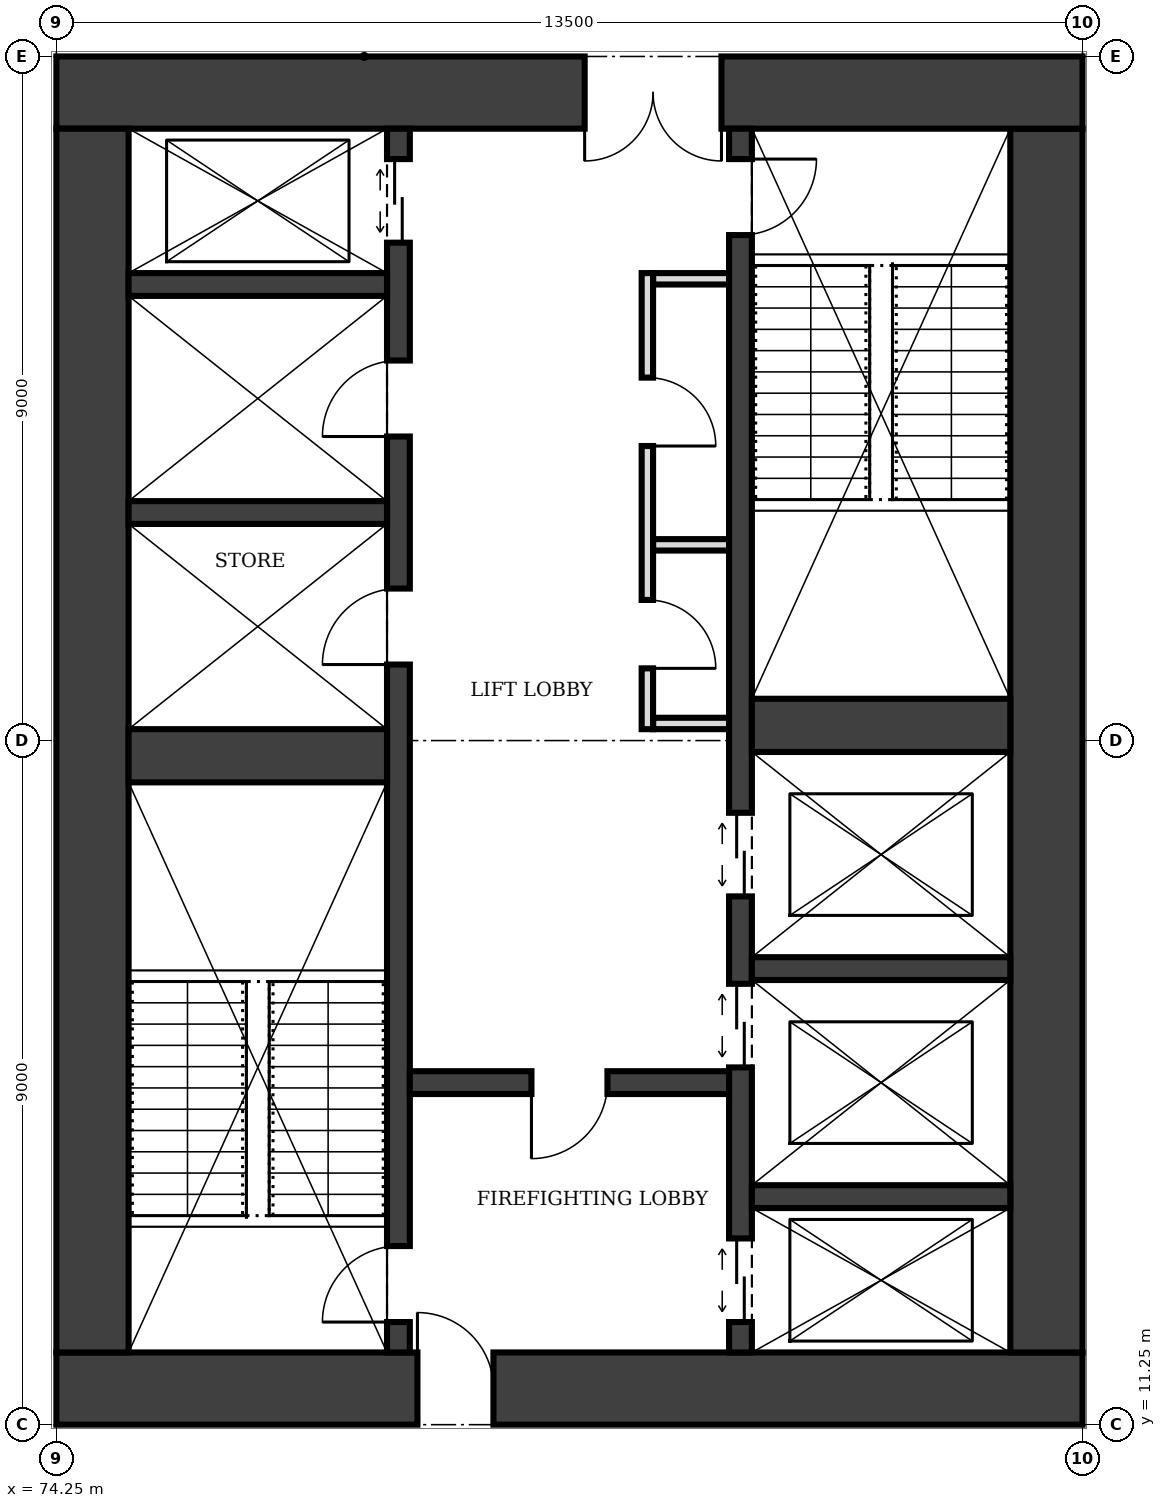
"""IFC4 building model, lengths in metres.
Left out: names, types, materials, properties, quantities, classifications, styles, units other than length and angle.
Written with IfcOpenShell. Run it as: python <this file> out.ifc"""

import sys

from ifc_helpers import new_model, si_unit, direction, frame, frame_2d, origin, place, context, subcontext, project, spatial, rectangle, extrude, element, fill, save


model = new_model("IFC4")
c1 = context("Model", 3, precision=1e-05, world=origin(), true_north=direction((0.0, 1.0)))
c2 = subcontext(c1, "Body", "Model", "MODEL_VIEW")
j1 = project(units=[si_unit("LENGTHUNIT", "METRE"), si_unit("PLANEANGLEUNIT", "RADIAN")], contexts=[c1])
p1 = place(None, origin())
s1 = spatial("IfcSite", under=j1, at=p1, CompositionType="ELEMENT")
p2 = place(p1, origin())
s2 = spatial("IfcBuilding", under=s1, at=p2, CompositionType="ELEMENT")
p3 = place(p2, frame((0.0, 0.0, 181.0)))
s3 = spatial("IfcBuildingStorey", under=s2, at=p3, CompositionType="ELEMENT", Elevation=181.0)
p4 = place(p3, frame((74.25, 11.725, 0.0), z_axis=(0.0, 0.0, 1.0), x_axis=(1.0, 0.0, 0.0)))
e1 = element("IfcWall", 1, at=p4, inside=s3, PredefinedType="SHEAR", context=c2, shape_type="SweptSolid", body=[
    extrude(rectangle(XDim=13.5, YDim=0.95, at=frame_2d((6.75, 0.0))), origin(), (0.0, 0.0, 1.0), 4.0),
])
p5 = place(p4, frame((4.75, 0.0, 0.0)))
e2 = element("IfcOpeningElement", 2, at=p5, cuts=e1, PredefinedType="OPENING", context=c2, shape_type="SweptSolid", body=[
    extrude(rectangle(XDim=1.0, YDim=2.1, at=frame_2d((0.5, 1.05))), frame((0.0, 0.485, 0.0), z_axis=(0.0, -1.0, 0.0), x_axis=(1.0, 0.0, 0.0)), (0.0, 0.0, 1.0), 0.97),
])
p6 = place(p3, frame((87.275, 12.2, 0.0), z_axis=(0.0, 0.0, 1.0), x_axis=(0.0, 1.0, 0.0)))
e3 = element("IfcWall", 3, at=p6, inside=s3, PredefinedType="SHEAR", context=c2, shape_type="SweptSolid", body=[
    extrude(rectangle(XDim=16.1, YDim=0.95, at=frame_2d((8.05, 0.0))), origin(), (0.0, 0.0, 1.0), 4.0),
])
p7 = place(p3, frame((87.75, 28.775, 0.0), z_axis=(0.0, 0.0, 1.0), x_axis=(-1.0, 0.0, 0.0)))
e4 = element("IfcWall", 4, at=p7, inside=s3, PredefinedType="SHEAR", context=c2, shape_type="SweptSolid", body=[
    extrude(rectangle(XDim=13.5, YDim=0.95, at=frame_2d((6.75, 0.0))), origin(), (0.0, 0.0, 1.0), 4.0),
])
p8 = place(p7, frame((4.75, 0.0, 0.0)))
e5 = element("IfcOpeningElement", 5, at=p8, cuts=e4, PredefinedType="OPENING", context=c2, shape_type="SweptSolid", body=[
    extrude(rectangle(XDim=1.8, YDim=2.1, at=frame_2d((0.9, 1.05))), frame((0.0, 0.485, 0.0), z_axis=(0.0, -1.0, 0.0), x_axis=(1.0, 0.0, 0.0)), (0.0, 0.0, 1.0), 0.97),
])
p9 = place(p3, frame((74.725, 28.3, 0.0), z_axis=(0.0, 0.0, 1.0), x_axis=(0.0, -1.0, 0.0)))
e6 = element("IfcWall", 6, at=p9, inside=s3, PredefinedType="SHEAR", context=c2, shape_type="SweptSolid", body=[
    extrude(rectangle(XDim=16.1, YDim=0.95, at=frame_2d((8.05, 0.0))), origin(), (0.0, 0.0, 1.0), 4.0),
])
p10 = place(p3, frame((78.75, 12.2, 0.0), z_axis=(0.0, 0.0, 1.0), x_axis=(0.0, 1.0, 0.0)))
e7 = element("IfcWall", 7, at=p10, inside=s3, PredefinedType="SHEAR", context=c2, shape_type="SweptSolid", body=[
    extrude(rectangle(XDim=16.1, YDim=0.3, at=frame_2d((8.05, 0.0))), origin(), (0.0, 0.0, 1.0), 4.0),
])
p11 = place(p10, frame((0.4, 0.0, 0.0)))
e8 = element("IfcOpeningElement", 8, at=p11, cuts=e7, PredefinedType="OPENING", context=c2, shape_type="SweptSolid", body=[
    extrude(rectangle(XDim=1.0, YDim=2.1, at=frame_2d((0.5, 1.05))), frame((0.0, 0.16, 0.0), z_axis=(0.0, -1.0, 0.0), x_axis=(1.0, 0.0, 0.0)), (0.0, 0.0, 1.0), 0.32),
])
p12 = place(p10, frame((14.6, 0.0, 0.0)))
e9 = element("IfcOpeningElement", 9, at=p12, cuts=e7, PredefinedType="OPENING", context=c2, shape_type="SweptSolid", body=[
    extrude(rectangle(XDim=1.1, YDim=2.1, at=frame_2d((0.55, 1.05))), frame((0.0, 0.16, 0.0), z_axis=(0.0, -1.0, 0.0), x_axis=(1.0, 0.0, 0.0)), (0.0, 0.0, 1.0), 0.32),
])
p13 = place(p10, frame((9.05, 0.0, 0.0)))
e10 = element("IfcOpeningElement", 10, at=p13, cuts=e7, PredefinedType="OPENING", context=c2, shape_type="SweptSolid", body=[
    extrude(rectangle(XDim=1.0, YDim=2.1, at=frame_2d((0.5, 1.05))), frame((0.0, 0.16, 0.0), z_axis=(0.0, -1.0, 0.0), x_axis=(1.0, 0.0, 0.0)), (0.0, 0.0, 1.0), 0.32),
])
p14 = place(p10, frame((12.05, 0.0, 0.0)))
e11 = element("IfcOpeningElement", 11, at=p14, cuts=e7, PredefinedType="OPENING", context=c2, shape_type="SweptSolid", body=[
    extrude(rectangle(XDim=1.0, YDim=2.1, at=frame_2d((0.5, 1.05))), frame((0.0, 0.16, 0.0), z_axis=(0.0, -1.0, 0.0), x_axis=(1.0, 0.0, 0.0)), (0.0, 0.0, 1.0), 0.32),
])
p15 = place(p3, frame((83.25, 12.2, 0.0), z_axis=(0.0, 0.0, 1.0), x_axis=(0.0, 1.0, 0.0)))
e12 = element("IfcWall", 12, at=p15, inside=s3, PredefinedType="SHEAR", context=c2, shape_type="SweptSolid", body=[
    extrude(rectangle(XDim=16.1, YDim=0.3, at=frame_2d((8.05, 0.0))), origin(), (0.0, 0.0, 1.0), 4.0),
])
p16 = place(p15, frame((14.7, 0.0, 0.0)))
e13 = element("IfcOpeningElement", 13, at=p16, cuts=e12, PredefinedType="OPENING", context=c2, shape_type="SweptSolid", body=[
    extrude(rectangle(XDim=1.0, YDim=2.1, at=frame_2d((0.5, 1.05))), frame((0.0, 0.16, 0.0), z_axis=(0.0, -1.0, 0.0), x_axis=(1.0, 0.0, 0.0)), (0.0, 0.0, 1.0), 0.32),
])
p17 = place(p15, frame((0.4, 0.0, 0.0)))
e14 = element("IfcOpeningElement", 14, at=p17, cuts=e12, PredefinedType="OPENING", context=c2, shape_type="SweptSolid", body=[
    extrude(rectangle(XDim=1.1, YDim=2.1, at=frame_2d((0.55, 1.05))), frame((0.0, 0.16, 0.0), z_axis=(0.0, -1.0, 0.0), x_axis=(1.0, 0.0, 0.0)), (0.0, 0.0, 1.0), 0.32),
])
p18 = place(p15, frame((3.75, 0.0, 0.0)))
e15 = element("IfcOpeningElement", 15, at=p18, cuts=e12, PredefinedType="OPENING", context=c2, shape_type="SweptSolid", body=[
    extrude(rectangle(XDim=1.1, YDim=2.1, at=frame_2d((0.55, 1.05))), frame((0.0, 0.16, 0.0), z_axis=(0.0, -1.0, 0.0), x_axis=(1.0, 0.0, 0.0)), (0.0, 0.0, 1.0), 0.32),
])
p19 = place(p15, frame((6.0, 0.0, 0.0)))
e16 = element("IfcOpeningElement", 16, at=p19, cuts=e12, PredefinedType="OPENING", context=c2, shape_type="SweptSolid", body=[
    extrude(rectangle(XDim=1.1, YDim=2.1, at=frame_2d((0.55, 1.05))), frame((0.0, 0.16, 0.0), z_axis=(0.0, -1.0, 0.0), x_axis=(1.0, 0.0, 0.0)), (0.0, 0.0, 1.0), 0.32),
])
p20 = place(p3, frame((75.2, 20.05, 0.0), z_axis=(0.0, 0.0, 1.0), x_axis=(1.0, 0.0, 0.0)))
e17 = element("IfcWall", 17, at=p20, inside=s3, PredefinedType="SHEAR", context=c2, shape_type="SweptSolid", body=[
    extrude(rectangle(XDim=3.4, YDim=0.7, at=frame_2d((1.7, 0.0))), origin(), (0.0, 0.0, 1.0), 4.0),
])
p21 = place(p3, frame((78.9, 15.75, 0.0), z_axis=(0.0, 0.0, 1.0), x_axis=(1.0, 0.0, 0.0)))
e18 = element("IfcWall", 18, at=p21, inside=s3, PredefinedType="SHEAR", context=c2, shape_type="SweptSolid", body=[
    extrude(rectangle(XDim=4.2, YDim=0.3, at=frame_2d((2.1, 0.0))), origin(), (0.0, 0.0, 1.0), 4.0),
])
p22 = place(p21, frame((1.6, 0.0, 0.0)))
e19 = element("IfcOpeningElement", 19, at=p22, cuts=e18, PredefinedType="OPENING", context=c2, shape_type="SweptSolid", body=[
    extrude(rectangle(XDim=1.0, YDim=2.1, at=frame_2d((0.5, 1.05))), frame((0.0, 0.16, 0.0), z_axis=(0.0, -1.0, 0.0), x_axis=(1.0, 0.0, 0.0)), (0.0, 0.0, 1.0), 0.32),
])
for number, where, z_axis, x_axis in (
    (20, (83.4, 14.25, 0.0), (0.0, 0.0, 1.0), (1.0, 0.0, 0.0)),
    (21, (83.4, 17.25, 0.0), (0.0, 0.0, 1.0), (1.0, 0.0, 0.0)),
):
    element("IfcWall", number, at=place(p3, frame(where, z_axis=z_axis, x_axis=x_axis)), inside=s3, PredefinedType="SHEAR", context=c2, shape_type="SweptSolid", body=[
        extrude(rectangle(XDim=3.4, YDim=0.3, at=frame_2d((1.7, 0.0))), origin(), (0.0, 0.0, 1.0), 4.0),
    ])
p23 = place(p3, frame((83.4, 20.45, 0.0), z_axis=(0.0, 0.0, 1.0), x_axis=(1.0, 0.0, 0.0)))
e22 = element("IfcWall", 22, at=p23, inside=s3, PredefinedType="SHEAR", context=c2, shape_type="SweptSolid", body=[
    extrude(rectangle(XDim=3.4, YDim=0.7, at=frame_2d((1.7, 0.0))), origin(), (0.0, 0.0, 1.0), 4.0),
])
for number, where, z_axis, x_axis in (
    (23, (75.2, 23.25, 0.0), (0.0, 0.0, 1.0), (1.0, 0.0, 0.0)),
    (24, (75.2, 26.25, 0.0), (0.0, 0.0, 1.0), (1.0, 0.0, 0.0)),
):
    element("IfcWall", number, at=place(p3, frame(where, z_axis=z_axis, x_axis=x_axis)), inside=s3, PredefinedType="SHEAR", context=c2, shape_type="SweptSolid", body=[
        extrude(rectangle(XDim=3.4, YDim=0.3, at=frame_2d((1.7, 0.0))), origin(), (0.0, 0.0, 1.0), 4.0),
    ])
p24 = place(p3, frame((82.025, 20.4, 0.0), z_axis=(0.0, 0.0, 1.0), x_axis=(0.0, 1.0, 0.0)))
e25 = element("IfcWall", 25, at=p24, inside=s3, PredefinedType="PARTITIONING", context=c2, shape_type="SweptSolid", body=[
    extrude(rectangle(XDim=6.0, YDim=0.15, at=frame_2d((3.0, 0.0))), origin(), (0.0, 0.0, 1.0), 3.75),
])
p25 = place(p24, frame((0.8, 0.0, 0.0)))
e26 = element("IfcOpeningElement", 26, at=p25, cuts=e25, PredefinedType="OPENING", context=c2, shape_type="SweptSolid", body=[
    extrude(rectangle(XDim=0.9, YDim=2.1, at=frame_2d((0.45, 1.05))), frame((0.0, 0.085, 0.0), z_axis=(0.0, -1.0, 0.0), x_axis=(1.0, 0.0, 0.0)), (0.0, 0.0, 1.0), 0.17),
])
p26 = place(p24, frame((3.725, 0.0, 0.0)))
e27 = element("IfcOpeningElement", 27, at=p26, cuts=e25, PredefinedType="OPENING", context=c2, shape_type="SweptSolid", body=[
    extrude(rectangle(XDim=0.9, YDim=2.1, at=frame_2d((0.45, 1.05))), frame((0.0, 0.085, 0.0), z_axis=(0.0, -1.0, 0.0), x_axis=(1.0, 0.0, 0.0)), (0.0, 0.0, 1.0), 0.17),
])
for number, where, z_axis, x_axis in (
    (28, (82.1, 20.475, 0.0), (0.0, 0.0, 1.0), (1.0, 0.0, 0.0)),
    (29, (82.1, 22.825, 0.0), (0.0, 0.0, 1.0), (1.0, 0.0, 0.0)),
    (30, (82.1, 26.325, 0.0), (0.0, 0.0, 1.0), (1.0, 0.0, 0.0)),
):
    element("IfcWall", number, at=place(p3, frame(where, z_axis=z_axis, x_axis=x_axis)), inside=s3, PredefinedType="PARTITIONING", context=c2, shape_type="SweptSolid", body=[
        extrude(rectangle(XDim=1.0, YDim=0.15, at=frame_2d((0.5, 0.0))), origin(), (0.0, 0.0, 1.0), 3.75),
    ])
p27 = place(p5, origin())
e31 = element("IfcDoor", 31, at=p27, inside=s3, OperationType="SINGLE_SWING_LEFT", PredefinedType="DOOR", context=c2, shape_type="SweptSolid", body=[
    extrude(rectangle(XDim=1.0, YDim=2.1, at=frame_2d((0.5, 1.05))), frame((0.0, 0.025, 0.0), z_axis=(0.0, -1.0, 0.0), x_axis=(1.0, 0.0, 0.0)), (0.0, 0.0, 1.0), 0.05),
])
fill(e2, e31)
p28 = place(p8, origin())
e32 = element("IfcDoor", 32, at=p28, inside=s3, OperationType="DOUBLE_DOOR_SINGLE_SWING", PredefinedType="DOOR", context=c2, shape_type="SweptSolid", body=[
    extrude(rectangle(XDim=1.8, YDim=2.1, at=frame_2d((0.9, 1.05))), frame((0.0, 0.025, 0.0), z_axis=(0.0, -1.0, 0.0), x_axis=(1.0, 0.0, 0.0)), (0.0, 0.0, 1.0), 0.05),
])
fill(e5, e32)
p29 = place(p22, frame((1.0, 0.0, 0.0), z_axis=(0.0, 0.0, 1.0), x_axis=(-1.0, 0.0, 0.0)))
e33 = element("IfcDoor", 33, at=p29, inside=s3, OperationType="SINGLE_SWING_RIGHT", PredefinedType="DOOR", context=c2, shape_type="SweptSolid", body=[
    extrude(rectangle(XDim=1.0, YDim=2.1, at=frame_2d((0.5, 1.05))), frame((0.0, 0.025, 0.0), z_axis=(0.0, -1.0, 0.0), x_axis=(1.0, 0.0, 0.0)), (0.0, 0.0, 1.0), 0.05),
])
fill(e19, e33)
p30 = place(p11, origin())
e34 = element("IfcDoor", 34, at=p30, inside=s3, OperationType="SINGLE_SWING_LEFT", PredefinedType="DOOR", context=c2, shape_type="SweptSolid", body=[
    extrude(rectangle(XDim=1.0, YDim=2.1, at=frame_2d((0.5, 1.05))), frame((0.0, 0.025, 0.0), z_axis=(0.0, -1.0, 0.0), x_axis=(1.0, 0.0, 0.0)), (0.0, 0.0, 1.0), 0.05),
])
fill(e8, e34)
p31 = place(p16, frame((1.0, 0.0, 0.0), z_axis=(0.0, 0.0, 1.0), x_axis=(-1.0, 0.0, 0.0)))
e35 = element("IfcDoor", 35, at=p31, inside=s3, OperationType="SINGLE_SWING_LEFT", PredefinedType="DOOR", context=c2, shape_type="SweptSolid", body=[
    extrude(rectangle(XDim=1.0, YDim=2.1, at=frame_2d((0.5, 1.05))), frame((0.0, 0.025, 0.0), z_axis=(0.0, -1.0, 0.0), x_axis=(1.0, 0.0, 0.0)), (0.0, 0.0, 1.0), 0.05),
])
fill(e13, e35)
p32 = place(p17, origin())
e36 = element("IfcDoor", 36, at=p32, inside=s3, OperationType="DOUBLE_DOOR_SLIDING", PredefinedType="DOOR", context=c2, shape_type="SweptSolid", body=[
    extrude(rectangle(XDim=1.1, YDim=2.1, at=frame_2d((0.55, 1.05))), frame((0.0, 0.025, 0.0), z_axis=(0.0, -1.0, 0.0), x_axis=(1.0, 0.0, 0.0)), (0.0, 0.0, 1.0), 0.05),
])
fill(e14, e36)
p33 = place(p12, origin())
e37 = element("IfcDoor", 37, at=p33, inside=s3, OperationType="DOUBLE_DOOR_SLIDING", PredefinedType="DOOR", context=c2, shape_type="SweptSolid", body=[
    extrude(rectangle(XDim=1.1, YDim=2.1, at=frame_2d((0.55, 1.05))), frame((0.0, 0.025, 0.0), z_axis=(0.0, -1.0, 0.0), x_axis=(1.0, 0.0, 0.0)), (0.0, 0.0, 1.0), 0.05),
])
fill(e9, e37)
p34 = place(p18, origin())
e38 = element("IfcDoor", 38, at=p34, inside=s3, OperationType="DOUBLE_DOOR_SLIDING", PredefinedType="DOOR", context=c2, shape_type="SweptSolid", body=[
    extrude(rectangle(XDim=1.1, YDim=2.1, at=frame_2d((0.55, 1.05))), frame((0.0, 0.025, 0.0), z_axis=(0.0, -1.0, 0.0), x_axis=(1.0, 0.0, 0.0)), (0.0, 0.0, 1.0), 0.05),
])
fill(e15, e38)
p35 = place(p19, origin())
e39 = element("IfcDoor", 39, at=p35, inside=s3, OperationType="DOUBLE_DOOR_SLIDING", PredefinedType="DOOR", context=c2, shape_type="SweptSolid", body=[
    extrude(rectangle(XDim=1.1, YDim=2.1, at=frame_2d((0.55, 1.05))), frame((0.0, 0.025, 0.0), z_axis=(0.0, -1.0, 0.0), x_axis=(1.0, 0.0, 0.0)), (0.0, 0.0, 1.0), 0.05),
])
fill(e16, e39)
p36 = place(p25, frame((0.9, 0.0, 0.0), z_axis=(0.0, 0.0, 1.0), x_axis=(-1.0, 0.0, 0.0)))
e40 = element("IfcDoor", 40, at=p36, inside=s3, OperationType="SINGLE_SWING_RIGHT", PredefinedType="DOOR", context=c2, shape_type="SweptSolid", body=[
    extrude(rectangle(XDim=0.9, YDim=2.1, at=frame_2d((0.45, 1.05))), frame((0.0, 0.025, 0.0), z_axis=(0.0, -1.0, 0.0), x_axis=(1.0, 0.0, 0.0)), (0.0, 0.0, 1.0), 0.05),
])
fill(e26, e40)
p37 = place(p26, frame((0.9, 0.0, 0.0), z_axis=(0.0, 0.0, 1.0), x_axis=(-1.0, 0.0, 0.0)))
e41 = element("IfcDoor", 41, at=p37, inside=s3, OperationType="SINGLE_SWING_RIGHT", PredefinedType="DOOR", context=c2, shape_type="SweptSolid", body=[
    extrude(rectangle(XDim=0.9, YDim=2.1, at=frame_2d((0.45, 1.05))), frame((0.0, 0.025, 0.0), z_axis=(0.0, -1.0, 0.0), x_axis=(1.0, 0.0, 0.0)), (0.0, 0.0, 1.0), 0.05),
])
fill(e27, e41)
p38 = place(p13, origin())
e42 = element("IfcDoor", 42, at=p38, inside=s3, OperationType="SINGLE_SWING_LEFT", PredefinedType="DOOR", context=c2, shape_type="SweptSolid", body=[
    extrude(rectangle(XDim=1.0, YDim=2.1, at=frame_2d((0.5, 1.05))), frame((0.0, 0.025, 0.0), z_axis=(0.0, -1.0, 0.0), x_axis=(1.0, 0.0, 0.0)), (0.0, 0.0, 1.0), 0.05),
])
fill(e10, e42)
p39 = place(p14, origin())
e43 = element("IfcDoor", 43, at=p39, inside=s3, OperationType="SINGLE_SWING_LEFT", PredefinedType="DOOR", context=c2, shape_type="SweptSolid", body=[
    extrude(rectangle(XDim=1.0, YDim=2.1, at=frame_2d((0.5, 1.05))), frame((0.0, 0.025, 0.0), z_axis=(0.0, -1.0, 0.0), x_axis=(1.0, 0.0, 0.0)), (0.0, 0.0, 1.0), 0.05),
])
fill(e11, e43)
save(model, sys.argv[1])
